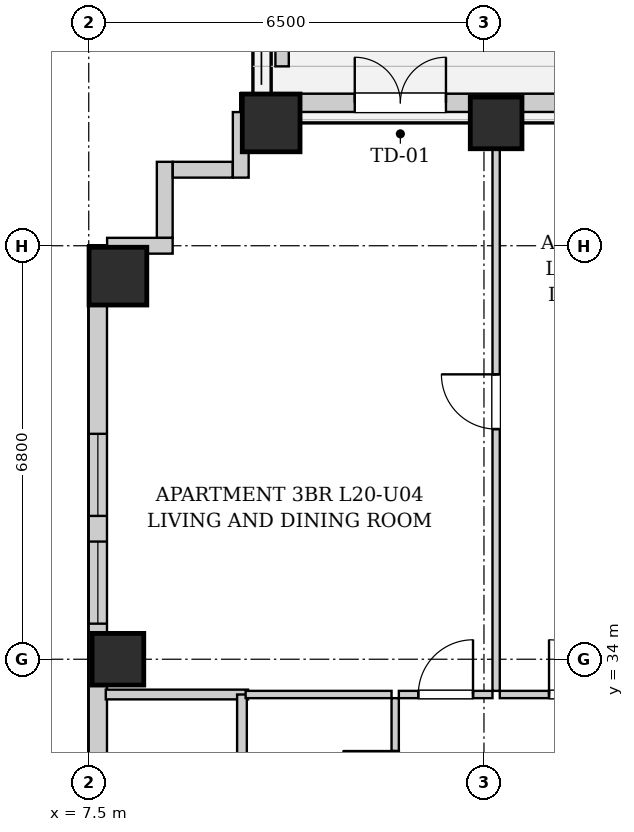
"""IFC4 building model, lengths in metres.
Left out: names, types, materials, properties, quantities, classifications, styles, units other than length and angle.
Written with IfcOpenShell. Run it as: python <this file> out.ifc"""

import sys

from ifc_helpers import new_model, si_unit, direction, frame, frame_2d, origin, origin_2d, place, context, subcontext, project, spatial, rectangle, extrude, element, fill, save


model = new_model("IFC4")
c1 = context("Model", 3, precision=1e-05, world=origin(), true_north=direction((0.0, 1.0)))
c2 = subcontext(c1, "Body", "Model", "MODEL_VIEW")
j1 = project(units=[si_unit("LENGTHUNIT", "METRE"), si_unit("PLANEANGLEUNIT", "RADIAN")], contexts=[c1])
p1 = place(None, origin())
s1 = spatial("IfcSite", under=j1, at=p1, CompositionType="ELEMENT")
p2 = place(p1, origin())
s2 = spatial("IfcBuilding", under=s1, at=p2, CompositionType="ELEMENT")
p3 = place(p2, frame((0.0, 0.0, 75.1)))
s3 = spatial("IfcBuildingStorey", under=s2, at=p3, CompositionType="ELEMENT", Elevation=75.1)
p4 = place(p3, frame((10.5, 42.82, 0.0), z_axis=(0.0, 0.0, 1.0), x_axis=(1.0, 0.0, 0.0)))
e1 = element("IfcColumn", 1, at=p4, inside=s3, PredefinedType="COLUMN", context=c2, shape_type="SweptSolid", body=[
    extrude(rectangle(XDim=0.95, YDim=0.95, at=origin_2d()), origin(), (0.0, 0.0, 1.0), 3.2),
])
for number, where, z_axis, x_axis in (
    (2, (14.2, 42.82, 0.0), (0.0, 0.0, 1.0), (1.0, 0.0, 0.0)),
    (3, (7.98, 34.0, 0.0), (0.0, 0.0, 1.0), (1.0, 0.0, 0.0)),
):
    element("IfcColumn", number, at=place(p3, frame(where, z_axis=z_axis, x_axis=x_axis)), inside=s3, PredefinedType="COLUMN", context=c2, shape_type="SweptSolid", body=[
        extrude(rectangle(XDim=0.85, YDim=0.85, at=origin_2d()), origin(), (0.0, 0.0, 1.0), 3.2),
    ])
p5 = place(p3, frame((7.98, 40.3, 0.0), z_axis=(0.0, 0.0, 1.0), x_axis=(1.0, 0.0, 0.0)))
e4 = element("IfcColumn", 4, at=p5, inside=s3, PredefinedType="COLUMN", context=c2, shape_type="SweptSolid", body=[
    extrude(rectangle(XDim=0.95, YDim=0.95, at=origin_2d()), origin(), (0.0, 0.0, 1.0), 3.2),
])
p6 = place(p3, frame((10.0, 43.15, 0.0), z_axis=(0.0, 0.0, 1.0), x_axis=(1.0, 0.0, 0.0)))
e5 = element("IfcWall", 5, at=p6, inside=s3, PredefinedType="SOLIDWALL", context=c2, shape_type="SweptSolid", body=[
    extrude(rectangle(XDim=23.7, YDim=0.3, at=frame_2d((11.85, 0.0))), origin(), (0.0, 0.0, 1.0), 2.94),
])
p7 = place(p6, frame((1.875, 0.0, 0.0)))
e6 = element("IfcOpeningElement", 6, at=p7, cuts=e5, PredefinedType="OPENING", context=c2, shape_type="SweptSolid", body=[
    extrude(rectangle(XDim=1.5, YDim=1.982, at=frame_2d((0.75, 0.991))), frame((0.0, 0.16, 0.0), z_axis=(0.0, -1.0, 0.0), x_axis=(1.0, 0.0, 0.0)), (0.0, 0.0, 1.0), 0.32),
])
p8 = place(p6, frame((5.625, 0.0, 0.55)))
e7 = element("IfcOpeningElement", 7, at=p8, cuts=e5, PredefinedType="OPENING", context=c2, shape_type="SweptSolid", body=[
    extrude(rectangle(XDim=1.35, YDim=1.2, at=frame_2d((0.675, 0.6))), frame((0.0, 0.16, 0.0), z_axis=(0.0, -1.0, 0.0), x_axis=(1.0, 0.0, 0.0)), (0.0, 0.0, 1.0), 0.32),
])
p9 = place(p6, frame((9.9, 0.0, 0.55)))
e8 = element("IfcOpeningElement", 8, at=p9, cuts=e5, PredefinedType="OPENING", context=c2, shape_type="SweptSolid", body=[
    extrude(rectangle(XDim=1.35, YDim=1.2, at=frame_2d((0.675, 0.6))), frame((0.0, 0.16, 0.0), z_axis=(0.0, -1.0, 0.0), x_axis=(1.0, 0.0, 0.0)), (0.0, 0.0, 1.0), 0.32),
])
p10 = place(p6, frame((18.675, 0.0, 0.55)))
e9 = element("IfcOpeningElement", 9, at=p10, cuts=e5, PredefinedType="OPENING", context=c2, shape_type="SweptSolid", body=[
    extrude(rectangle(XDim=1.35, YDim=1.2, at=frame_2d((0.675, 0.6))), frame((0.0, 0.16, 0.0), z_axis=(0.0, -1.0, 0.0), x_axis=(1.0, 0.0, 0.0)), (0.0, 0.0, 1.0), 0.32),
])
p11 = place(p6, frame((21.265, 0.0, 0.55)))
e10 = element("IfcOpeningElement", 10, at=p11, cuts=e5, PredefinedType="OPENING", context=c2, shape_type="SweptSolid", body=[
    extrude(rectangle(XDim=1.35, YDim=1.2, at=frame_2d((0.675, 0.6))), frame((0.0, 0.16, 0.0), z_axis=(0.0, -1.0, 0.0), x_axis=(1.0, 0.0, 0.0)), (0.0, 0.0, 1.0), 0.32),
])
p12 = place(p3, frame((7.65, 19.4, 0.0), z_axis=(0.0, 0.0, 1.0), x_axis=(0.0, 1.0, 0.0)))
e11 = element("IfcWall", 11, at=p12, inside=s3, PredefinedType="SOLIDWALL", context=c2, shape_type="SweptSolid", body=[
    extrude(rectangle(XDim=21.4, YDim=0.3, at=frame_2d((10.7, 0.0))), origin(), (0.0, 0.0, 1.0), 2.94),
])
p13 = place(p12, frame((16.957, 0.0, 0.55)))
e12 = element("IfcOpeningElement", 12, at=p13, cuts=e11, PredefinedType="OPENING", context=c2, shape_type="SweptSolid", body=[
    extrude(rectangle(XDim=1.35, YDim=1.2, at=frame_2d((0.675, 0.6))), frame((0.0, 0.16, 0.0), z_axis=(0.0, -1.0, 0.0), x_axis=(1.0, 0.0, 0.0)), (0.0, 0.0, 1.0), 0.32),
])
p14 = place(p12, frame((15.185, 0.0, 0.55)))
e13 = element("IfcOpeningElement", 13, at=p14, cuts=e11, PredefinedType="OPENING", context=c2, shape_type="SweptSolid", body=[
    extrude(rectangle(XDim=1.35, YDim=1.2, at=frame_2d((0.675, 0.6))), frame((0.0, 0.16, 0.0), z_axis=(0.0, -1.0, 0.0), x_axis=(1.0, 0.0, 0.0)), (0.0, 0.0, 1.0), 0.32),
])
p15 = place(p3, frame((7.802, 40.8, 0.0), z_axis=(0.0, 0.0, 1.0), x_axis=(1.0, 0.0, 0.0)))
e14 = element("IfcWall", 14, at=p15, inside=s3, PredefinedType="SOLIDWALL", context=c2, shape_type="SweptSolid", body=[
    extrude(rectangle(XDim=1.078, YDim=0.26, at=frame_2d((0.539, 0.0))), origin(), (0.0, 0.0, 1.0), 2.94),
])
p16 = place(p3, frame((8.75, 40.932, 0.0), z_axis=(0.0, 0.0, 1.0), x_axis=(0.0, 1.0, 0.0)))
e15 = element("IfcWall", 15, at=p16, inside=s3, PredefinedType="SOLIDWALL", context=c2, shape_type="SweptSolid", body=[
    extrude(rectangle(XDim=1.248, YDim=0.26, at=frame_2d((0.624, 0.0))), origin(), (0.0, 0.0, 1.0), 2.94),
])
p17 = place(p3, frame((8.882, 42.05, 0.0), z_axis=(0.0, 0.0, 1.0), x_axis=(1.0, 0.0, 0.0)))
e16 = element("IfcWall", 16, at=p17, inside=s3, PredefinedType="SOLIDWALL", context=c2, shape_type="SweptSolid", body=[
    extrude(rectangle(XDim=0.986, YDim=0.26, at=frame_2d((0.493, 0.0))), origin(), (0.0, 0.0, 1.0), 2.94),
])
p18 = place(p3, frame((10.0, 41.92, 0.0), z_axis=(0.0, 0.0, 1.0), x_axis=(0.0, 1.0, 0.0)))
e17 = element("IfcWall", 17, at=p18, inside=s3, PredefinedType="SOLIDWALL", context=c2, shape_type="SweptSolid", body=[
    extrude(rectangle(XDim=1.078, YDim=0.26, at=frame_2d((0.539, 0.0))), origin(), (0.0, 0.0, 1.0), 2.94),
])
p19 = place(p3, frame((10.68, 43.75, 0.0), z_axis=(0.0, 0.0, 1.0), x_axis=(0.0, 1.0, 0.0)))
e18 = element("IfcWall", 18, at=p19, inside=s3, PredefinedType="PARAPET", context=c2, shape_type="SweptSolid", body=[
    extrude(rectangle(XDim=3.0, YDim=0.22, at=frame_2d((1.5, 0.0))), origin(), (0.0, 0.0, 1.0), 0.65),
])
p20 = place(p3, frame((7.78, 33.42, 0.0), z_axis=(0.0, 0.0, 1.0), x_axis=(1.0, 0.0, 0.0)))
e19 = element("IfcWall", 19, at=p20, inside=s3, PredefinedType="PARTITIONING", context=c2, shape_type="SweptSolid", body=[
    extrude(rectangle(XDim=2.34, YDim=0.16, at=frame_2d((1.17, 0.0))), origin(), (0.0, 0.0, 1.0), 2.94),
])
p21 = place(p3, frame((10.02, 30.76, 0.0), z_axis=(0.0, 0.0, 1.0), x_axis=(0.0, 1.0, 0.0)))
e20 = element("IfcWall", 20, at=p21, inside=s3, PredefinedType="PARTITIONING", context=c2, shape_type="SweptSolid", body=[
    extrude(rectangle(XDim=2.66, YDim=0.16, at=frame_2d((1.33, 0.0))), origin(), (0.0, 0.0, 1.0), 2.94),
])
p22 = place(p3, frame((12.54, 30.76, 0.0), z_axis=(0.0, 0.0, 1.0), x_axis=(0.0, 1.0, 0.0)))
e21 = element("IfcWall", 21, at=p22, inside=s3, PredefinedType="PARTITIONING", context=c2, shape_type="SweptSolid", body=[
    extrude(rectangle(XDim=2.6, YDim=0.12, at=frame_2d((1.3, 0.0))), origin(), (0.0, 0.0, 1.0), 2.94),
])
p23 = place(p22, frame((0.87, 0.0, 0.0)))
e22 = element("IfcOpeningElement", 22, at=p23, cuts=e21, PredefinedType="OPENING", context=c2, shape_type="SweptSolid", body=[
    extrude(rectangle(XDim=0.86, YDim=2.05, at=frame_2d((0.43, 1.025))), frame((0.0, 0.07, 0.0), z_axis=(0.0, -1.0, 0.0), x_axis=(1.0, 0.0, 0.0)), (0.0, 0.0, 1.0), 0.14),
])
p24 = place(p3, frame((10.08, 33.42, 0.0), z_axis=(0.0, 0.0, 1.0), x_axis=(1.0, 0.0, 0.0)))
e23 = element("IfcWall", 23, at=p24, inside=s3, PredefinedType="PARTITIONING", context=c2, shape_type="SweptSolid", body=[
    extrude(rectangle(XDim=2.4, YDim=0.12, at=frame_2d((1.2, 0.0))), origin(), (0.0, 0.0, 1.0), 2.94),
])
p25 = place(p3, frame((12.6, 33.42, 0.0), z_axis=(0.0, 0.0, 1.0), x_axis=(1.0, 0.0, 0.0)))
e24 = element("IfcWall", 24, at=p25, inside=s3, PredefinedType="PARTITIONING", context=c2, shape_type="SweptSolid", body=[
    extrude(rectangle(XDim=1.54, YDim=0.12, at=frame_2d((0.77, 0.0))), origin(), (0.0, 0.0, 1.0), 2.94),
])
p26 = place(p25, frame((0.32, 0.0, 0.0)))
e25 = element("IfcOpeningElement", 25, at=p26, cuts=e24, PredefinedType="OPENING", context=c2, shape_type="SweptSolid", body=[
    extrude(rectangle(XDim=0.9, YDim=2.05, at=frame_2d((0.45, 1.025))), frame((0.0, 0.07, 0.0), z_axis=(0.0, -1.0, 0.0), x_axis=(1.0, 0.0, 0.0)), (0.0, 0.0, 1.0), 0.14),
])
p27 = place(p3, frame((14.26, 33.42, 0.0), z_axis=(0.0, 0.0, 1.0), x_axis=(1.0, 0.0, 0.0)))
e26 = element("IfcWall", 26, at=p27, inside=s3, PredefinedType="PARTITIONING", context=c2, shape_type="SweptSolid", body=[
    extrude(rectangle(XDim=2.52, YDim=0.12, at=frame_2d((1.26, 0.0))), origin(), (0.0, 0.0, 1.0), 2.94),
])
p28 = place(p27, frame((0.81, 0.0, 0.0)))
e27 = element("IfcOpeningElement", 27, at=p28, cuts=e26, PredefinedType="OPENING", context=c2, shape_type="SweptSolid", body=[
    extrude(rectangle(XDim=0.9, YDim=2.05, at=frame_2d((0.45, 1.025))), frame((0.0, 0.07, 0.0), z_axis=(0.0, -1.0, 0.0), x_axis=(1.0, 0.0, 0.0)), (0.0, 0.0, 1.0), 0.14),
])
p29 = place(p3, frame((14.2, 33.48, 0.0), z_axis=(0.0, 0.0, 1.0), x_axis=(0.0, 1.0, 0.0)))
e28 = element("IfcWall", 28, at=p29, inside=s3, PredefinedType="PARTITIONING", context=c2, shape_type="SweptSolid", body=[
    extrude(rectangle(XDim=9.54, YDim=0.12, at=frame_2d((4.77, 0.0))), origin(), (0.0, 0.0, 1.0), 2.94),
])
p30 = place(p29, frame((4.305, 0.0, 0.0)))
e29 = element("IfcOpeningElement", 29, at=p30, cuts=e28, PredefinedType="OPENING", context=c2, shape_type="SweptSolid", body=[
    extrude(rectangle(XDim=0.9, YDim=2.05, at=frame_2d((0.45, 1.025))), frame((0.0, 0.07, 0.0), z_axis=(0.0, -1.0, 0.0), x_axis=(1.0, 0.0, 0.0)), (0.0, 0.0, 1.0), 0.14),
])
p31 = place(p23, origin())
e30 = element("IfcDoor", 30, at=p31, inside=s3, OperationType="SINGLE_SWING_RIGHT", PredefinedType="DOOR", context=c2, shape_type="SweptSolid", body=[
    extrude(rectangle(XDim=0.86, YDim=2.05, at=frame_2d((0.43, 1.025))), frame((0.0, 0.025, 0.0), z_axis=(0.0, -1.0, 0.0), x_axis=(1.0, 0.0, 0.0)), (0.0, 0.0, 1.0), 0.05),
])
fill(e22, e30)
p32 = place(p26, origin())
e31 = element("IfcDoor", 31, at=p32, inside=s3, OperationType="SINGLE_SWING_RIGHT", PredefinedType="DOOR", context=c2, shape_type="SweptSolid", body=[
    extrude(rectangle(XDim=0.9, YDim=2.05, at=frame_2d((0.45, 1.025))), frame((0.0, 0.025, 0.0), z_axis=(0.0, -1.0, 0.0), x_axis=(1.0, 0.0, 0.0)), (0.0, 0.0, 1.0), 0.05),
])
fill(e25, e31)
p33 = place(p28, origin())
e32 = element("IfcDoor", 32, at=p33, inside=s3, OperationType="SINGLE_SWING_LEFT", PredefinedType="DOOR", context=c2, shape_type="SweptSolid", body=[
    extrude(rectangle(XDim=0.9, YDim=2.05, at=frame_2d((0.45, 1.025))), frame((0.0, 0.025, 0.0), z_axis=(0.0, -1.0, 0.0), x_axis=(1.0, 0.0, 0.0)), (0.0, 0.0, 1.0), 0.05),
])
fill(e27, e32)
p34 = place(p30, origin())
e33 = element("IfcDoor", 33, at=p34, inside=s3, OperationType="SINGLE_SWING_RIGHT", PredefinedType="DOOR", context=c2, shape_type="SweptSolid", body=[
    extrude(rectangle(XDim=0.9, YDim=2.05, at=frame_2d((0.45, 1.025))), frame((0.0, 0.025, 0.0), z_axis=(0.0, -1.0, 0.0), x_axis=(1.0, 0.0, 0.0)), (0.0, 0.0, 1.0), 0.05),
])
fill(e29, e33)
p35 = place(p7, origin())
e34 = element("IfcDoor", 34, at=p35, inside=s3, OperationType="DOUBLE_SWING_LEFT", PredefinedType="DOOR", context=c2, shape_type="SweptSolid", body=[
    extrude(rectangle(XDim=1.5, YDim=1.982, at=frame_2d((0.75, 0.991))), frame((0.0, 0.025, 0.0), z_axis=(0.0, -1.0, 0.0), x_axis=(1.0, 0.0, 0.0)), (0.0, 0.0, 1.0), 0.05),
])
fill(e6, e34)
p36 = place(p13, origin())
e35 = element("IfcWindow", 35, at=p36, inside=s3, PartitioningType="SINGLE_PANEL", PredefinedType="WINDOW", context=c2, shape_type="SweptSolid", body=[
    extrude(rectangle(XDim=1.35, YDim=1.2, at=frame_2d((0.675, 0.6))), frame((0.0, 0.03, 0.0), z_axis=(0.0, -1.0, 0.0), x_axis=(1.0, 0.0, 0.0)), (0.0, 0.0, 1.0), 0.06),
])
fill(e12, e35)
p37 = place(p14, origin())
e36 = element("IfcWindow", 36, at=p37, inside=s3, PartitioningType="SINGLE_PANEL", PredefinedType="WINDOW", context=c2, shape_type="SweptSolid", body=[
    extrude(rectangle(XDim=1.35, YDim=1.2, at=frame_2d((0.675, 0.6))), frame((0.0, 0.03, 0.0), z_axis=(0.0, -1.0, 0.0), x_axis=(1.0, 0.0, 0.0)), (0.0, 0.0, 1.0), 0.06),
])
fill(e13, e36)
save(model, sys.argv[1])
